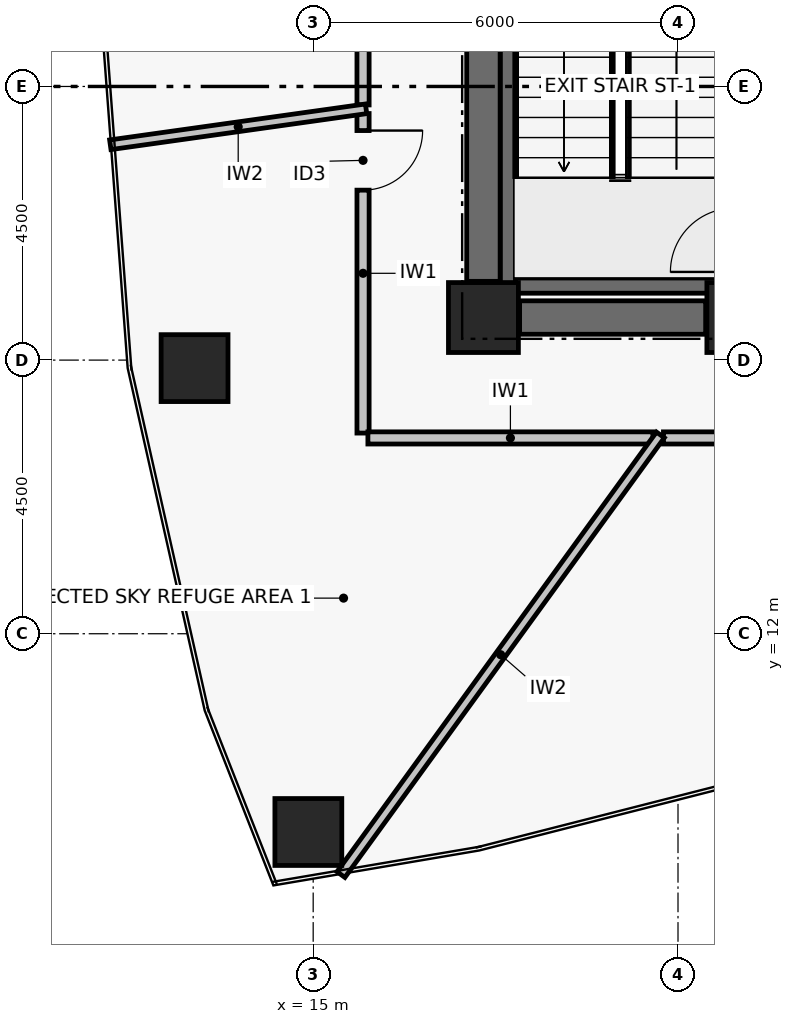
"""IFC4 building model, lengths in metres.
Left out: names, types, materials, properties, quantities, classifications, styles, units other than length and angle.
Written with IfcOpenShell. Run it as: python <this file> out.ifc"""

import sys

from ifc_helpers import new_model, si_unit, direction, frame, frame_2d, origin, origin_2d, place, context, subcontext, project, spatial, rectangle, hollow_rectangle, extrude, element, fill, save


model = new_model("IFC4")
c1 = context("Model", 3, precision=1e-05, world=origin(), true_north=direction((0.0, 1.0)))
c2 = subcontext(c1, "Body", "Model", "MODEL_VIEW")
j1 = project(units=[si_unit("LENGTHUNIT", "METRE"), si_unit("PLANEANGLEUNIT", "RADIAN")], contexts=[c1])
p1 = place(None, origin())
s1 = spatial("IfcSite", under=j1, at=p1, CompositionType="ELEMENT")
p2 = place(p1, origin())
s2 = spatial("IfcBuilding", under=s1, at=p2, CompositionType="ELEMENT")
p3 = place(p2, frame((0.0, 0.0, 148.62)))
s3 = spatial("IfcBuildingStorey", under=s2, at=p3, CompositionType="ELEMENT", Elevation=148.62)
for number, where, z_axis, x_axis in (
    (1, (17.8, 17.2, 0.0), (0.0, 0.0, 1.0), (1.0, 0.0, 0.0)),
    (2, (22.05, 17.2, 0.0), (0.0, 0.0, 1.0), (1.0, 0.0, 0.0)),
):
    element("IfcColumn", number, at=place(p3, frame(where, z_axis=z_axis, x_axis=x_axis)), inside=s3, PredefinedType="COLUMN", context=c2, shape_type="SweptSolid", body=[
        extrude(rectangle(XDim=1.15, YDim=1.15, at=origin_2d()), origin(), (0.0, 0.0, 1.0), 5.7),
    ])
p4 = place(p3, frame((18.395, 17.2, 0.0), z_axis=(0.0, 0.0, 1.0), x_axis=(1.0, 0.0, 0.0)))
e3 = element("IfcWall", 3, at=p4, inside=s3, PredefinedType="SHEAR", context=c2, shape_type="SweptSolid", body=[
    extrude(rectangle(XDim=3.06, YDim=0.55, at=frame_2d((1.53, 0.0))), origin(), (0.0, 0.0, 1.0), 5.42),
])
p5 = place(p3, frame((17.8, 17.795, 0.0), z_axis=(0.0, 0.0, 1.0), x_axis=(0.0, 1.0, 0.0)))
e4 = element("IfcWall", 4, at=p5, inside=s3, PredefinedType="SHEAR", context=c2, shape_type="SweptSolid", body=[
    extrude(rectangle(XDim=8.41, YDim=0.55, at=frame_2d((4.205, 0.0))), origin(), (0.0, 0.0, 1.0), 5.42),
])
p6 = place(p3, frame((18.204, 17.6, 0.0), z_axis=(0.0, 0.0, 1.0), x_axis=(0.0, 1.0, 0.0)))
e5 = element("IfcWall", 5, at=p6, inside=s3, PredefinedType="SHEAR", context=c2, shape_type="SweptSolid", body=[
    extrude(rectangle(XDim=8.8, YDim=0.25, at=frame_2d((4.4, 0.0))), origin(), (0.0, 0.0, 1.0), 5.42),
])
p7 = place(p3, frame((18.329, 17.725, 0.0), z_axis=(0.0, 0.0, 1.0), x_axis=(1.0, 0.0, 0.0)))
e6 = element("IfcWall", 6, at=p7, inside=s3, PredefinedType="SHEAR", context=c2, shape_type="SweptSolid", body=[
    extrude(rectangle(XDim=3.471, YDim=0.25, at=frame_2d((1.735, 0.0))), origin(), (0.0, 0.0, 1.0), 5.42),
])
for number, where, z_axis, x_axis in (
    (7, (13.049, 16.368, 0.0), (0.0, 0.0, 1.0), (1.0, 0.0, 0.0)),
    (8, (14.92, 8.74, 0.0), (0.0, 0.0, 1.0), (1.0, 0.0, 0.0)),
):
    element("IfcColumn", number, at=place(p3, frame(where, z_axis=z_axis, x_axis=x_axis)), inside=s3, PredefinedType="COLUMN", context=c2, shape_type="SweptSolid", body=[
        extrude(hollow_rectangle(XDim=1.1, YDim=1.1, WallThickness=0.045, at=origin_2d()), origin(), (0.0, 0.0, 1.0), 5.7),
    ])
p8 = place(p3, frame((15.82, 20.555, 0.0), z_axis=(0.0, 0.0, 1.0), x_axis=(0.0, -1.0, 0.0)))
e9 = element("IfcWall", 9, at=p8, inside=s3, PredefinedType="PARTITIONING", context=c2, shape_type="SweptSolid", body=[
    extrude(rectangle(XDim=5.255, YDim=0.2, at=frame_2d((2.627, 0.0))), origin(), (0.0, 0.0, 1.0), 4.15),
])
p9 = place(p8, frame((0.28, 0.0, 0.0)))
e10 = element("IfcOpeningElement", 10, at=p9, cuts=e9, PredefinedType="OPENING", context=c2, shape_type="SweptSolid", body=[
    extrude(rectangle(XDim=0.98, YDim=2.06, at=frame_2d((0.49, 1.03))), frame((0.0, 0.11, 0.0), z_axis=(0.0, -1.0, 0.0), x_axis=(1.0, 0.0, 0.0)), (0.0, 0.0, 1.0), 0.22),
])
p10 = place(p3, frame((15.9, 15.22, 0.0), z_axis=(0.0, 0.0, 1.0), x_axis=(1.0, 0.0, 0.0)))
e11 = element("IfcWall", 11, at=p10, inside=s3, PredefinedType="PARTITIONING", context=c2, shape_type="SweptSolid", body=[
    extrude(rectangle(XDim=4.688, YDim=0.2, at=frame_2d((2.344, 0.0))), origin(), (0.0, 0.0, 1.0), 4.15),
])
p11 = place(p3, frame((20.76, 15.22, 0.0), z_axis=(0.0, 0.0, 1.0), x_axis=(1.0, 0.0, 0.0)))
e12 = element("IfcWall", 12, at=p11, inside=s3, PredefinedType="PARTITIONING", context=c2, shape_type="SweptSolid", body=[
    extrude(rectangle(XDim=5.964, YDim=0.2, at=frame_2d((2.982, 0.0))), origin(), (0.0, 0.0, 1.0), 4.15),
])
p12 = place(p11, frame((4.151, 0.0, 0.0)))
e13 = element("IfcOpeningElement", 13, at=p12, cuts=e12, PredefinedType="OPENING", context=c2, shape_type="SweptSolid", body=[
    extrude(rectangle(XDim=0.98, YDim=2.06, at=frame_2d((0.49, 1.03))), frame((0.0, 0.11, 0.0), z_axis=(0.0, -1.0, 0.0), x_axis=(1.0, 0.0, 0.0)), (0.0, 0.0, 1.0), 0.22),
])
p13 = place(p3, frame((15.82, 28.7, 0.0), z_axis=(0.0, 0.0, 1.0), x_axis=(0.0, -1.0, 0.0)))
e14 = element("IfcWall", 14, at=p13, inside=s3, PredefinedType="PARTITIONING", context=c2, shape_type="SweptSolid", body=[
    extrude(rectangle(XDim=8.004, YDim=0.2, at=frame_2d((4.002, 0.0))), origin(), (0.0, 0.0, 1.0), 4.15),
])
p14 = place(p13, frame((5.936, 0.0, 0.0)))
e15 = element("IfcOpeningElement", 15, at=p14, cuts=e14, PredefinedType="OPENING", context=c2, shape_type="SweptSolid", body=[
    extrude(rectangle(XDim=0.98, YDim=2.06, at=frame_2d((0.49, 1.03))), frame((0.0, 0.11, 0.0), z_axis=(0.0, -1.0, 0.0), x_axis=(1.0, 0.0, 0.0)), (0.0, 0.0, 1.0), 0.22),
])
p15 = place(p3, frame((15.87, 20.633, 0.0), z_axis=(0.0, 0.0, 1.0), x_axis=(-0.990272175973, -0.139143873362, 0.0)))
e16 = element("IfcWall", 16, at=p15, inside=s3, PredefinedType="PARTITIONING", context=c2, shape_type="SweptSolid", body=[
    extrude(rectangle(XDim=4.248, YDim=0.16, at=frame_2d((2.124, 0.0))), origin(), (0.0, 0.0, 1.0), 4.85),
])
p16 = place(p3, frame((20.71, 15.27, 0.0), z_axis=(0.0, 0.0, 1.0), x_axis=(-0.587798062304, -0.809007687202, 0.0)))
e17 = element("IfcWall", 17, at=p16, inside=s3, PredefinedType="PARTITIONING", context=c2, shape_type="SweptSolid", body=[
    extrude(rectangle(XDim=8.938, YDim=0.16, at=frame_2d((4.469, 0.0))), origin(), (0.0, 0.0, 1.0), 4.85),
])
p17 = place(p9, origin())
e18 = element("IfcDoor", 18, at=p17, inside=s3, OperationType="SINGLE_SWING_LEFT", PredefinedType="DOOR", context=c2, shape_type="SweptSolid", body=[
    extrude(rectangle(XDim=0.98, YDim=2.06, at=frame_2d((0.49, 1.03))), frame((0.0, 0.025, 0.0), z_axis=(0.0, -1.0, 0.0), x_axis=(1.0, 0.0, 0.0)), (0.0, 0.0, 1.0), 0.05),
])
fill(e10, e18)
save(model, sys.argv[1])
